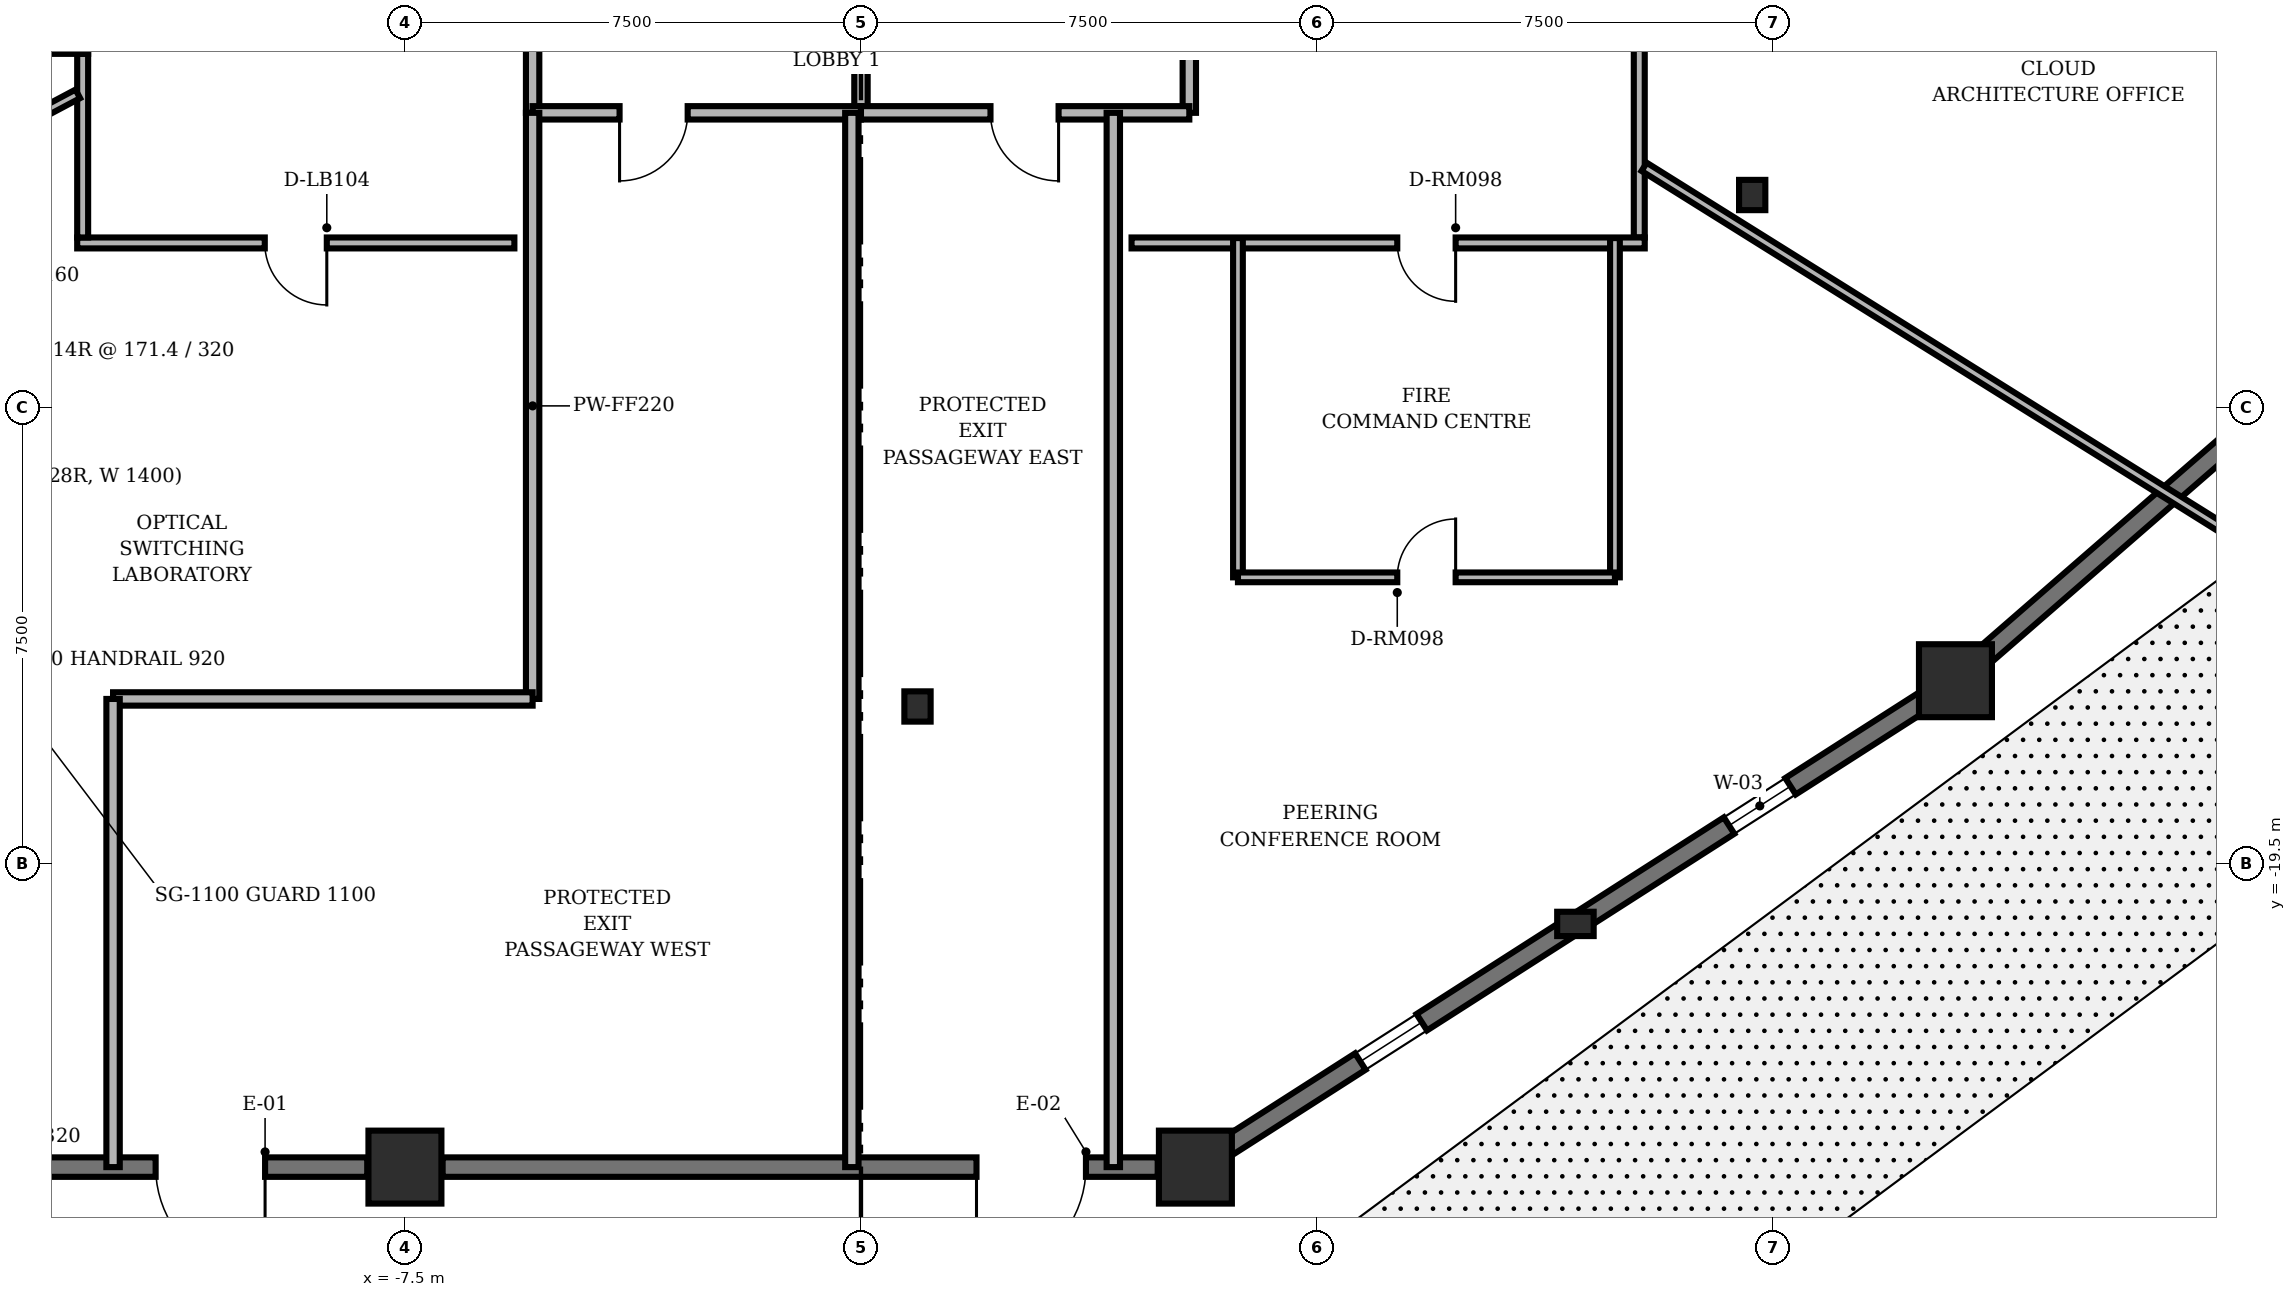
"""IFC4 building model, lengths in metres.
Left out: names, types, materials, properties, quantities, classifications, styles, units other than length and angle.
Written with IfcOpenShell. Run it as: python <this file> out.ifc"""

import sys

from ifc_helpers import new_model, si_unit, direction, frame, frame_2d, origin, origin_2d, place, context, subcontext, project, spatial, rectangle, i_section, extrude, element, fill, save


model = new_model("IFC4")
c1 = context("Model", 3, precision=1e-05, world=origin(), true_north=direction((0.0, 1.0)))
c2 = subcontext(c1, "Body", "Model", "MODEL_VIEW")
j1 = project(units=[si_unit("LENGTHUNIT", "METRE"), si_unit("PLANEANGLEUNIT", "RADIAN")], contexts=[c1])
p1 = place(None, origin())
s1 = spatial("IfcSite", under=j1, at=p1, CompositionType="ELEMENT")
p2 = place(p1, origin())
s2 = spatial("IfcBuilding", under=s1, at=p2, CompositionType="ELEMENT")
p3 = place(p2, origin())
s3 = spatial("IfcBuildingStorey", under=s2, at=p3, CompositionType="ELEMENT", Elevation=0.0)
for number, where, z_axis, x_axis in (
    (1, (-7.5, -24.5, 0.0), (0.0, 0.0, 1.0), (1.0, 0.0, 0.0)),
    (2, (5.5, -24.5, 0.0), (0.0, 0.0, 1.0), (1.0, 0.0, 0.0)),
    (3, (18.0, -16.5, 0.0), (0.0, 0.0, 1.0), (1.0, 0.0, 0.0)),
):
    element("IfcColumn", number, at=place(p3, frame(where, z_axis=z_axis, x_axis=x_axis)), inside=s3, PredefinedType="COLUMN", context=c2, shape_type="SweptSolid", body=[
        extrude(rectangle(XDim=1.2, YDim=1.2, at=origin_2d()), origin(), (0.0, 0.0, 1.0), 4.8),
    ])
for number, where, z_axis, x_axis in (
    (4, (0.93, -16.924, 0.0), (0.0, 0.0, 1.0), (1.0, 0.0, 0.0)),
    (5, (14.657, -8.512, 0.0), (0.0, 0.0, 1.0), (1.0, 0.0, 0.0)),
):
    element("IfcColumn", number, at=place(p3, frame(where, z_axis=z_axis, x_axis=x_axis)), inside=s3, PredefinedType="COLUMN", context=c2, shape_type="SweptSolid", body=[
        extrude(i_section(OverallWidth=0.432, OverallDepth=0.498, WebThickness=0.056, FlangeThickness=0.089, FilletRadius=0.025, at=origin_2d()), origin(), (0.0, 0.0, 1.0), 4.8),
    ])
p4 = place(p3, frame((11.75, -20.5, 0.0), z_axis=(0.0, 0.0, 1.0), x_axis=(1.0, 0.0, 0.0)))
e6 = element("IfcColumn", 6, at=p4, inside=s3, PredefinedType="PILASTER", context=c2, shape_type="SweptSolid", body=[
    extrude(rectangle(XDim=0.6, YDim=0.4, at=origin_2d()), origin(), (0.0, 0.0, 1.0), 4.8),
])
p5 = place(p3, frame((-8.12, -24.5, 0.0), z_axis=(0.0, 0.0, 1.0), x_axis=(-1.0, 0.0, 0.0)))
e7 = element("IfcWall", 7, at=p5, inside=s3, PredefinedType="SOLIDWALL", context=c2, shape_type="SweptSolid", body=[
    extrude(rectangle(XDim=12.76, YDim=0.32, at=frame_2d((6.38, 0.0))), origin(), (0.0, 0.0, 1.0), 3.868),
])
p6 = place(p5, frame((1.68, 0.0, 0.0)))
e8 = element("IfcOpeningElement", 8, at=p6, cuts=e7, PredefinedType="OPENING", context=c2, shape_type="SweptSolid", body=[
    extrude(rectangle(XDim=1.8, YDim=2.3, at=frame_2d((0.9, 1.15))), frame((0.0, 0.17, 0.0), z_axis=(0.0, -1.0, 0.0), x_axis=(1.0, 0.0, 0.0)), (0.0, 0.0, 1.0), 0.34),
])
p7 = place(p5, frame((7.9, 0.0, 0.0)))
e9 = element("IfcOpeningElement", 9, at=p7, cuts=e7, PredefinedType="OPENING", context=c2, shape_type="SweptSolid", body=[
    extrude(rectangle(XDim=1.8, YDim=2.3, at=frame_2d((0.9, 1.15))), frame((0.0, 0.17, 0.0), z_axis=(0.0, -1.0, 0.0), x_axis=(1.0, 0.0, 0.0)), (0.0, 0.0, 1.0), 0.34),
])
p8 = place(p3, frame((4.88, -24.5, 0.0), z_axis=(0.0, 0.0, 1.0), x_axis=(-1.0, 0.0, 0.0)))
e10 = element("IfcWall", 10, at=p8, inside=s3, PredefinedType="SOLIDWALL", context=c2, shape_type="SweptSolid", body=[
    extrude(rectangle(XDim=11.76, YDim=0.32, at=frame_2d((5.88, 0.0))), origin(), (0.0, 0.0, 1.0), 3.868),
])
p9 = place(p8, frame((1.18, 0.0, 0.0)))
e11 = element("IfcOpeningElement", 11, at=p9, cuts=e10, PredefinedType="OPENING", context=c2, shape_type="SweptSolid", body=[
    extrude(rectangle(XDim=1.8, YDim=2.3, at=frame_2d((0.9, 1.15))), frame((0.0, 0.17, 0.0), z_axis=(0.0, -1.0, 0.0), x_axis=(1.0, 0.0, 0.0)), (0.0, 0.0, 1.0), 0.34),
])
p10 = place(p3, frame((17.478, -16.834, 0.0), z_axis=(0.0, 0.0, 1.0), x_axis=(-0.842272052664, -0.539052677667, 0.0)))
e12 = element("IfcWall", 12, at=p10, inside=s3, PredefinedType="SOLIDWALL", context=c2, shape_type="SweptSolid", body=[
    extrude(rectangle(XDim=13.601, YDim=0.32, at=frame_2d((6.8, 0.0))), origin(), (0.0, 0.0, 1.0), 3.868),
])
p11 = place(p10, frame((2.6, 0.0, 0.65)))
e13 = element("IfcOpeningElement", 13, at=p11, cuts=e12, PredefinedType="OPENING", context=c2, shape_type="SweptSolid", body=[
    extrude(rectangle(XDim=1.2, YDim=1.6, at=frame_2d((0.6, 0.8))), frame((0.0, 0.17, 0.0), z_axis=(0.0, -1.0, 0.0), x_axis=(1.0, 0.0, 0.0)), (0.0, 0.0, 1.0), 0.34),
])
p12 = place(p10, frame((9.8, 0.0, 0.65)))
e14 = element("IfcOpeningElement", 14, at=p12, cuts=e12, PredefinedType="OPENING", context=c2, shape_type="SweptSolid", body=[
    extrude(rectangle(XDim=1.2, YDim=1.6, at=frame_2d((0.6, 0.8))), frame((0.0, 0.17, 0.0), z_axis=(0.0, -1.0, 0.0), x_axis=(1.0, 0.0, 0.0)), (0.0, 0.0, 1.0), 0.34),
])
p13 = place(p3, frame((29.032, -6.907, 0.0), z_axis=(0.0, 0.0, 1.0), x_axis=(-0.754589002666, -0.656197711863, 0.0)))
e15 = element("IfcWall", 15, at=p13, inside=s3, PredefinedType="SOLIDWALL", context=c2, shape_type="SweptSolid", body=[
    extrude(rectangle(XDim=14.0, YDim=0.32, at=frame_2d((7.0, 0.0))), origin(), (0.0, 0.0, 1.0), 3.868),
])
p14 = place(p13, frame((6.1, 0.0, 0.0)))
e16 = element("IfcOpeningElement", 16, at=p14, cuts=e15, PredefinedType="OPENING", context=c2, shape_type="SweptSolid", body=[
    extrude(rectangle(XDim=1.8, YDim=2.3, at=frame_2d((0.9, 1.15))), frame((0.0, 0.17, 0.0), z_axis=(0.0, -1.0, 0.0), x_axis=(1.0, 0.0, 0.0)), (0.0, 0.0, 1.0), 0.34),
])
for number, where, z_axis, x_axis in (
    (17, (-5.4, -7.16, 0.0), (0.0, 0.0, 1.0), (0.0, 1.0, 0.0)),
    (18, (5.4, -7.16, 0.0), (0.0, 0.0, 1.0), (0.0, 1.0, 0.0)),
):
    element("IfcWall", number, at=place(p3, frame(where, z_axis=z_axis, x_axis=x_axis)), inside=s3, PredefinedType="PARTITIONING", context=c2, shape_type="SweptSolid", body=[
        extrude(rectangle(XDim=2.71, YDim=0.22, at=frame_2d((1.355, 0.0))), origin(), (0.0, 0.0, 1.0), 4.473),
    ])
p15 = place(p3, frame((0.0, -7.16, 0.0), z_axis=(0.0, 0.0, 1.0), x_axis=(0.0, 1.0, 0.0)))
e19 = element("IfcWall", 19, at=p15, inside=s3, PredefinedType="PARTITIONING", context=c2, shape_type="SweptSolid", body=[
    extrude(rectangle(XDim=2.81, YDim=0.22, at=frame_2d((1.405, 0.0))), origin(), (0.0, 0.0, 1.0), 4.473),
])
p16 = place(p3, frame((0.0, -7.16, 0.0), z_axis=(0.0, 0.0, 1.0), x_axis=(-1.0, 0.0, 0.0)))
e20 = element("IfcWall", 20, at=p16, inside=s3, PredefinedType="PARTITIONING", context=c2, shape_type="SweptSolid", body=[
    extrude(rectangle(XDim=5.4, YDim=0.22, at=frame_2d((2.7, 0.0))), origin(), (0.0, 0.0, 1.0), 4.473),
])
p17 = place(p16, frame((2.85, 0.0, 0.0)))
e21 = element("IfcOpeningElement", 21, at=p17, cuts=e20, PredefinedType="OPENING", context=c2, shape_type="SweptSolid", body=[
    extrude(rectangle(XDim=1.12, YDim=2.02, at=frame_2d((0.56, 1.01))), frame((0.0, 0.12, 0.0), z_axis=(0.0, -1.0, 0.0), x_axis=(1.0, 0.0, 0.0)), (0.0, 0.0, 1.0), 0.24),
])
p18 = place(p3, frame((5.4, -7.16, 0.0), z_axis=(0.0, 0.0, 1.0), x_axis=(-1.0, 0.0, 0.0)))
e22 = element("IfcWall", 22, at=p18, inside=s3, PredefinedType="PARTITIONING", context=c2, shape_type="SweptSolid", body=[
    extrude(rectangle(XDim=5.4, YDim=0.22, at=frame_2d((2.7, 0.0))), origin(), (0.0, 0.0, 1.0), 4.473),
])
p19 = place(p18, frame((2.15, 0.0, 0.0)))
e23 = element("IfcOpeningElement", 23, at=p19, cuts=e22, PredefinedType="OPENING", context=c2, shape_type="SweptSolid", body=[
    extrude(rectangle(XDim=1.12, YDim=2.02, at=frame_2d((0.56, 1.01))), frame((0.0, 0.12, 0.0), z_axis=(0.0, -1.0, 0.0), x_axis=(1.0, 0.0, 0.0)), (0.0, 0.0, 1.0), 0.24),
])
p20 = place(p3, frame((-5.4, -16.8, 0.0), z_axis=(0.0, 0.0, 1.0), x_axis=(0.0, 1.0, 0.0)))
e24 = element("IfcWall", 24, at=p20, inside=s3, PredefinedType="PARTITIONING", context=c2, shape_type="SweptSolid", body=[
    extrude(rectangle(XDim=9.64, YDim=0.22, at=frame_2d((4.82, 0.0))), origin(), (0.0, 0.0, 1.0), 4.473),
])
p21 = place(p3, frame((-12.3, -16.8, 0.0), z_axis=(0.0, 0.0, 1.0), x_axis=(1.0, 0.0, 0.0)))
e25 = element("IfcWall", 25, at=p21, inside=s3, PredefinedType="PARTITIONING", context=c2, shape_type="SweptSolid", body=[
    extrude(rectangle(XDim=6.9, YDim=0.22, at=frame_2d((3.45, 0.0))), origin(), (0.0, 0.0, 1.0), 4.473),
])
p22 = place(p3, frame((-12.3, -24.5, 0.0), z_axis=(0.0, 0.0, 1.0), x_axis=(0.0, 1.0, 0.0)))
e26 = element("IfcWall", 26, at=p22, inside=s3, PredefinedType="PARTITIONING", context=c2, shape_type="SweptSolid", body=[
    extrude(rectangle(XDim=7.7, YDim=0.22, at=frame_2d((3.85, 0.0))), origin(), (0.0, 0.0, 1.0), 4.473),
])
for number, where, z_axis, x_axis in (
    (27, (-0.15, -24.5, 0.0), (0.0, 0.0, 1.0), (0.0, 1.0, 0.0)),
    (28, (4.15, -24.5, 0.0), (0.0, 0.0, 1.0), (0.0, 1.0, 0.0)),
):
    element("IfcWall", number, at=place(p3, frame(where, z_axis=z_axis, x_axis=x_axis)), inside=s3, PredefinedType="PARTITIONING", context=c2, shape_type="SweptSolid", body=[
        extrude(rectangle(XDim=17.34, YDim=0.22, at=frame_2d((8.67, 0.0))), origin(), (0.0, 0.0, 1.0), 4.473),
    ])
p23 = place(p3, frame((12.8, -1.59, 0.0), z_axis=(0.0, 0.0, 1.0), x_axis=(0.0, -1.0, 0.0)))
e29 = element("IfcWall", 29, at=p23, inside=s3, PredefinedType="PARTITIONING", context=c2, shape_type="SweptSolid", body=[
    extrude(rectangle(XDim=7.62, YDim=0.18, at=frame_2d((3.81, 0.0))), origin(), (0.0, 0.0, 1.0), 4.473),
])
p24 = place(p3, frame((12.89, -9.3, 0.0), z_axis=(0.0, 0.0, 1.0), x_axis=(-1.0, 0.0, 0.0)))
e30 = element("IfcWall", 30, at=p24, inside=s3, PredefinedType="PARTITIONING", context=c2, shape_type="SweptSolid", body=[
    extrude(rectangle(XDim=8.44, YDim=0.18, at=frame_2d((4.22, 0.0))), origin(), (0.0, 0.0, 1.0), 3.987),
])
p25 = place(p24, frame((3.11, 0.0, 0.0)))
e31 = element("IfcOpeningElement", 31, at=p25, cuts=e30, PredefinedType="OPENING", context=c2, shape_type="SweptSolid", body=[
    extrude(rectangle(XDim=0.96, YDim=2.02, at=frame_2d((0.48, 1.01))), frame((0.0, 0.1, 0.0), z_axis=(0.0, -1.0, 0.0), x_axis=(1.0, 0.0, 0.0)), (0.0, 0.0, 1.0), 0.2),
])
p26 = place(p3, frame((-5.7, -9.3, 0.0), z_axis=(0.0, 0.0, 1.0), x_axis=(-1.0, 0.0, 0.0)))
e32 = element("IfcWall", 32, at=p26, inside=s3, PredefinedType="PARTITIONING", context=c2, shape_type="SweptSolid", body=[
    extrude(rectangle(XDim=7.19, YDim=0.18, at=frame_2d((3.595, 0.0))), origin(), (0.0, 0.0, 1.0), 3.987),
])
p27 = place(p26, frame((3.085, 0.0, 0.0)))
e33 = element("IfcOpeningElement", 33, at=p27, cuts=e32, PredefinedType="OPENING", context=c2, shape_type="SweptSolid", body=[
    extrude(rectangle(XDim=1.02, YDim=2.02, at=frame_2d((0.51, 1.01))), frame((0.0, 0.1, 0.0), z_axis=(0.0, -1.0, 0.0), x_axis=(1.0, 0.0, 0.0)), (0.0, 0.0, 1.0), 0.2),
])
p28 = place(p3, frame((-12.8, -9.21, 0.0), z_axis=(0.0, 0.0, 1.0), x_axis=(0.0, 1.0, 0.0)))
e34 = element("IfcWall", 34, at=p28, inside=s3, PredefinedType="PARTITIONING", context=c2, shape_type="SweptSolid", body=[
    extrude(rectangle(XDim=3.02, YDim=0.18, at=frame_2d((1.51, 0.0))), origin(), (0.0, 0.0, 1.0), 4.473),
])
p29 = place(p3, frame((-12.71, -6.1, 0.0), z_axis=(0.0, 0.0, 1.0), x_axis=(-1.0, 0.0, 0.0)))
e35 = element("IfcWall", 35, at=p29, inside=s3, PredefinedType="PARTITIONING", context=c2, shape_type="SweptSolid", body=[
    extrude(rectangle(XDim=7.43, YDim=0.18, at=frame_2d((3.715, 0.0))), origin(), (0.0, 0.0, 1.0), 4.473),
])
p30 = place(p29, frame((3.235, 0.0, 0.0)))
e36 = element("IfcOpeningElement", 36, at=p30, cuts=e35, PredefinedType="OPENING", context=c2, shape_type="SweptSolid", body=[
    extrude(rectangle(XDim=0.96, YDim=2.02, at=frame_2d((0.48, 1.01))), frame((0.0, 0.1, 0.0), z_axis=(0.0, -1.0, 0.0), x_axis=(1.0, 0.0, 0.0)), (0.0, 0.0, 1.0), 0.2),
])
p31 = place(p3, frame((-12.88, -6.848, 0.0), z_axis=(0.0, 0.0, 1.0), x_axis=(-0.882926709307, -0.469510836928, 0.0)))
e37 = element("IfcWall", 37, at=p31, inside=s3, PredefinedType="PARTITIONING", context=c2, shape_type="SweptSolid", body=[
    extrude(rectangle(XDim=1.823, YDim=0.16, at=frame_2d((0.912, 0.0))), origin(), (0.0, 0.0, 1.0), 4.473),
])
p32 = place(p3, frame((12.88, -8.048, 0.0), z_axis=(0.0, 0.0, 1.0), x_axis=(0.848053688019, -0.529910315278, 0.0)))
e38 = element("IfcWall", 38, at=p32, inside=s3, PredefinedType="PARTITIONING", context=c2, shape_type="SweptSolid", body=[
    extrude(rectangle(XDim=11.886, YDim=0.16, at=frame_2d((5.943, 0.0))), origin(), (0.0, 0.0, 1.0), 4.473),
])
p33 = place(p3, frame((12.4, -14.8, 0.0), z_axis=(0.0, 0.0, 1.0), x_axis=(0.0, 1.0, 0.0)))
e39 = element("IfcWall", 39, at=p33, inside=s3, PredefinedType="PARTITIONING", context=c2, shape_type="SweptSolid", body=[
    extrude(rectangle(XDim=5.58, YDim=0.16, at=frame_2d((2.79, 0.0))), origin(), (0.0, 0.0, 1.0), 4.473),
])
p34 = place(p3, frame((6.2, -9.22, 0.0), z_axis=(0.0, 0.0, 1.0), x_axis=(0.0, -1.0, 0.0)))
e40 = element("IfcWall", 40, at=p34, inside=s3, PredefinedType="PARTITIONING", context=c2, shape_type="SweptSolid", body=[
    extrude(rectangle(XDim=5.58, YDim=0.16, at=frame_2d((2.79, 0.0))), origin(), (0.0, 0.0, 1.0), 3.598),
])
p35 = place(p3, frame((6.2, -14.8, 0.0), z_axis=(0.0, 0.0, 1.0), x_axis=(1.0, 0.0, 0.0)))
e41 = element("IfcWall", 41, at=p35, inside=s3, PredefinedType="PARTITIONING", context=c2, shape_type="SweptSolid", body=[
    extrude(rectangle(XDim=6.2, YDim=0.16, at=frame_2d((3.1, 0.0))), origin(), (0.0, 0.0, 1.0), 4.473),
])
p36 = place(p35, frame((2.62, 0.0, 0.0)))
e42 = element("IfcOpeningElement", 42, at=p36, cuts=e41, PredefinedType="OPENING", context=c2, shape_type="SweptSolid", body=[
    extrude(rectangle(XDim=0.96, YDim=2.02, at=frame_2d((0.48, 1.01))), frame((0.0, 0.09, 0.0), z_axis=(0.0, -1.0, 0.0), x_axis=(1.0, 0.0, 0.0)), (0.0, 0.0, 1.0), 0.18),
])
p37 = place(p6, origin())
e43 = element("IfcDoor", 43, at=p37, inside=s3, OperationType="SINGLE_SWING_LEFT", PredefinedType="DOOR", context=c2, shape_type="SweptSolid", body=[
    extrude(rectangle(XDim=1.8, YDim=2.3, at=frame_2d((0.9, 1.15))), frame((0.0, 0.025, 0.0), z_axis=(0.0, -1.0, 0.0), x_axis=(1.0, 0.0, 0.0)), (0.0, 0.0, 1.0), 0.05),
])
fill(e8, e43)
p38 = place(p9, origin())
e44 = element("IfcDoor", 44, at=p38, inside=s3, OperationType="SINGLE_SWING_RIGHT", PredefinedType="DOOR", context=c2, shape_type="SweptSolid", body=[
    extrude(rectangle(XDim=1.8, YDim=2.3, at=frame_2d((0.9, 1.15))), frame((0.0, 0.025, 0.0), z_axis=(0.0, -1.0, 0.0), x_axis=(1.0, 0.0, 0.0)), (0.0, 0.0, 1.0), 0.05),
])
fill(e11, e44)
p39 = place(p11, origin())
e45 = element("IfcWindow", 45, at=p39, inside=s3, PartitioningType="SINGLE_PANEL", PredefinedType="WINDOW", context=c2, shape_type="SweptSolid", body=[
    extrude(rectangle(XDim=1.2, YDim=1.6, at=frame_2d((0.6, 0.8))), frame((0.0, 0.03, 0.0), z_axis=(0.0, -1.0, 0.0), x_axis=(1.0, 0.0, 0.0)), (0.0, 0.0, 1.0), 0.06),
])
fill(e13, e45)
p40 = place(p12, origin())
e46 = element("IfcWindow", 46, at=p40, inside=s3, PartitioningType="SINGLE_PANEL", PredefinedType="WINDOW", context=c2, shape_type="SweptSolid", body=[
    extrude(rectangle(XDim=1.2, YDim=1.6, at=frame_2d((0.6, 0.8))), frame((0.0, 0.03, 0.0), z_axis=(0.0, -1.0, 0.0), x_axis=(1.0, 0.0, 0.0)), (0.0, 0.0, 1.0), 0.06),
])
fill(e14, e46)
p41 = place(p17, origin())
e47 = element("IfcDoor", 47, at=p41, inside=s3, OperationType="SINGLE_SWING_RIGHT", PredefinedType="DOOR", context=c2, shape_type="SweptSolid", body=[
    extrude(rectangle(XDim=1.12, YDim=2.02, at=frame_2d((0.56, 1.01))), frame((0.0, 0.025, 0.0), z_axis=(0.0, -1.0, 0.0), x_axis=(1.0, 0.0, 0.0)), (0.0, 0.0, 1.0), 0.05),
])
fill(e21, e47)
p42 = place(p19, origin())
e48 = element("IfcDoor", 48, at=p42, inside=s3, OperationType="SINGLE_SWING_LEFT", PredefinedType="DOOR", context=c2, shape_type="SweptSolid", body=[
    extrude(rectangle(XDim=1.12, YDim=2.02, at=frame_2d((0.56, 1.01))), frame((0.0, 0.025, 0.0), z_axis=(0.0, -1.0, 0.0), x_axis=(1.0, 0.0, 0.0)), (0.0, 0.0, 1.0), 0.05),
])
fill(e23, e48)
p43 = place(p25, origin())
e49 = element("IfcDoor", 49, at=p43, inside=s3, OperationType="SINGLE_SWING_LEFT", PredefinedType="DOOR", context=c2, shape_type="SweptSolid", body=[
    extrude(rectangle(XDim=0.96, YDim=2.02, at=frame_2d((0.48, 1.01))), frame((0.0, 0.025, 0.0), z_axis=(0.0, -1.0, 0.0), x_axis=(1.0, 0.0, 0.0)), (0.0, 0.0, 1.0), 0.05),
])
fill(e31, e49)
p44 = place(p27, origin())
e50 = element("IfcDoor", 50, at=p44, inside=s3, OperationType="SINGLE_SWING_LEFT", PredefinedType="DOOR", context=c2, shape_type="SweptSolid", body=[
    extrude(rectangle(XDim=1.02, YDim=2.02, at=frame_2d((0.51, 1.01))), frame((0.0, 0.025, 0.0), z_axis=(0.0, -1.0, 0.0), x_axis=(1.0, 0.0, 0.0)), (0.0, 0.0, 1.0), 0.05),
])
fill(e33, e50)
p45 = place(p36, origin())
e51 = element("IfcDoor", 51, at=p45, inside=s3, OperationType="SINGLE_SWING_RIGHT", PredefinedType="DOOR", context=c2, shape_type="SweptSolid", body=[
    extrude(rectangle(XDim=0.96, YDim=2.02, at=frame_2d((0.48, 1.01))), frame((0.0, 0.025, 0.0), z_axis=(0.0, -1.0, 0.0), x_axis=(1.0, 0.0, 0.0)), (0.0, 0.0, 1.0), 0.05),
])
fill(e42, e51)
save(model, sys.argv[1])
